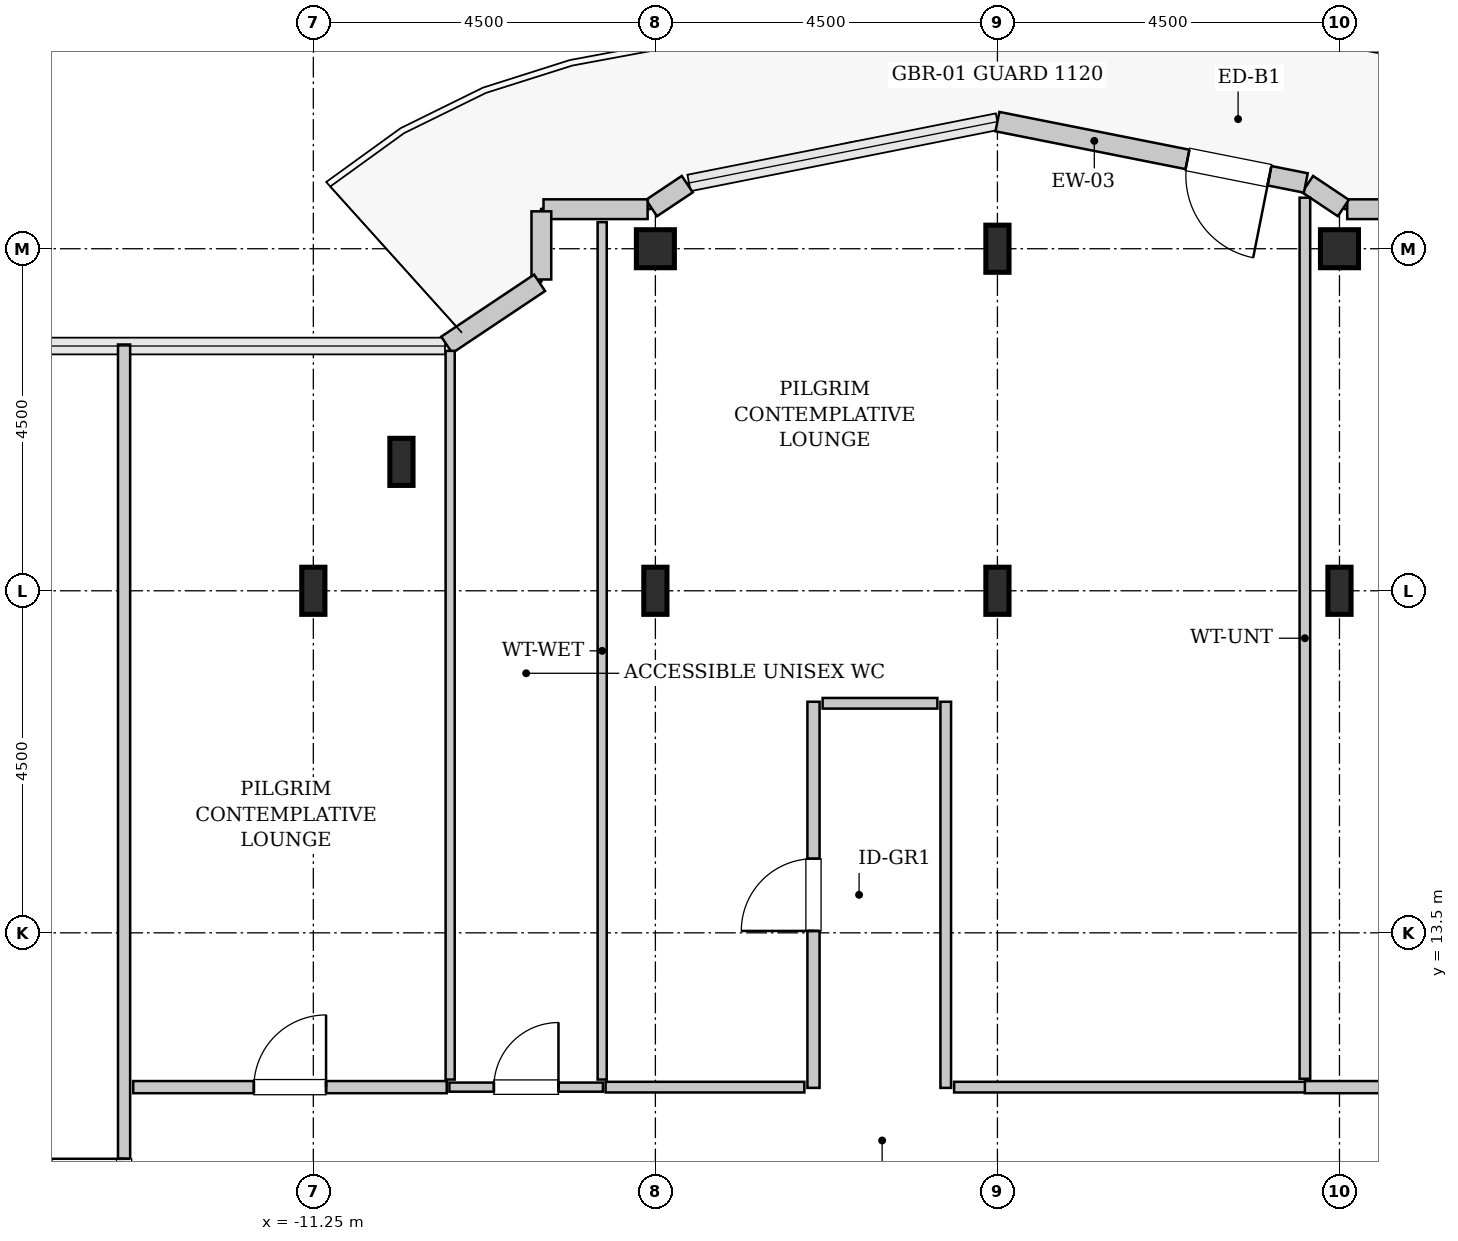
"""IFC4 building model, lengths in metres.
Left out: names, types, materials, properties, quantities, classifications, styles, units other than length and angle.
Written with IfcOpenShell. Run it as: python <this file> out.ifc"""

import sys

from ifc_helpers import new_model, si_unit, direction, frame, frame_2d, origin, origin_2d, place, context, subcontext, project, spatial, rectangle, hollow_rectangle, i_section, extrude, source, transform, mapped, element, fill, save


model = new_model("IFC4")
c1 = context("Model", 3, precision=1e-05, world=origin(), true_north=direction((0.0, 1.0)))
c2 = subcontext(c1, "Body", "Model", "MODEL_VIEW")
j1 = project(units=[si_unit("LENGTHUNIT", "METRE"), si_unit("PLANEANGLEUNIT", "RADIAN")], contexts=[c1])
p1 = place(None, origin())
s1 = spatial("IfcSite", under=j1, at=p1, CompositionType="ELEMENT")
p2 = place(p1, origin())
s2 = spatial("IfcBuilding", under=s1, at=p2, CompositionType="ELEMENT")
p3 = place(p2, frame((0.0, 0.0, 306.4)))
s3 = spatial("IfcBuildingStorey", under=s2, at=p3, CompositionType="ELEMENT", Elevation=306.4)
m1 = source(origin(), c2, "Body", "SweptSolid", [
    extrude(i_section(OverallWidth=0.305, OverallDepth=0.62, WebThickness=0.021, FlangeThickness=0.04, FilletRadius=0.027, at=origin_2d()), origin(), (0.0, 0.0, 1.0), 3.8),
])
for number, where, z_axis, x_axis in (
    (1, (-11.25, 18.0, 0.0), (0.0, 0.0, 1.0), (1.0, 0.0, 0.0)),
    (2, (-10.091, 19.696, 0.0), (0.0, 0.0, 1.0), (1.0, 0.0, 0.0)),
    (3, (-6.75, 18.0, 0.0), (0.0, 0.0, 1.0), (1.0, 0.0, 0.0)),
):
    element("IfcColumn", number, at=place(p3, frame(where, z_axis=z_axis, x_axis=x_axis)), inside=s3, PredefinedType="COLUMN", context=c2, shape_type="MappedRepresentation", body=[
        mapped(m1, transform((0.0, 0.0, 0.0), x_axis=(1.0, 0.0, 0.0), y_axis=(0.0, 1.0, 0.0), z_axis=(0.0, 0.0, 1.0), scale=1.0)),
    ])
m2 = source(origin(), c2, "Body", "SweptSolid", [
    extrude(hollow_rectangle(XDim=0.5, YDim=0.5, WallThickness=0.025, InnerFilletRadius=0.025, OuterFilletRadius=0.05, at=origin_2d()), origin(), (0.0, 0.0, 1.0), 3.8),
])
p4 = place(p3, frame((-6.75, 22.5, 0.0), z_axis=(0.0, 0.0, 1.0), x_axis=(1.0, 0.0, 0.0)))
e4 = element("IfcColumn", 4, at=p4, inside=s3, PredefinedType="COLUMN", context=c2, shape_type="MappedRepresentation", body=[
    mapped(m2, transform((0.0, 0.0, 0.0), x_axis=(1.0, 0.0, 0.0), y_axis=(0.0, 1.0, 0.0), z_axis=(0.0, 0.0, 1.0), scale=1.0)),
])
for number, where, z_axis, x_axis in (
    (5, (-2.25, 18.0, 0.0), (0.0, 0.0, 1.0), (1.0, 0.0, 0.0)),
    (6, (-2.25, 22.5, 0.0), (0.0, 0.0, 1.0), (1.0, 0.0, 0.0)),
    (7, (2.25, 18.0, 0.0), (0.0, 0.0, 1.0), (1.0, 0.0, 0.0)),
):
    element("IfcColumn", number, at=place(p3, frame(where, z_axis=z_axis, x_axis=x_axis)), inside=s3, PredefinedType="COLUMN", context=c2, shape_type="MappedRepresentation", body=[
        mapped(m1, transform((0.0, 0.0, 0.0), x_axis=(1.0, 0.0, 0.0), y_axis=(0.0, 1.0, 0.0), z_axis=(0.0, 0.0, 1.0), scale=1.0)),
    ])
p5 = place(p3, frame((2.25, 22.5, 0.0), z_axis=(0.0, 0.0, 1.0), x_axis=(1.0, 0.0, 0.0)))
e8 = element("IfcColumn", 8, at=p5, inside=s3, PredefinedType="COLUMN", context=c2, shape_type="MappedRepresentation", body=[
    mapped(m2, transform((0.0, 0.0, 0.0), x_axis=(1.0, 0.0, 0.0), y_axis=(0.0, 1.0, 0.0), z_axis=(0.0, 0.0, 1.0), scale=1.0)),
])
m3 = source(origin(), c2, "Body", "SweptSolid", [
    extrude(rectangle(XDim=1.37, YDim=0.26, at=frame_2d((0.685, 0.0))), origin(), (0.0, 0.0, 1.0), 3.55),
])
p6 = place(p3, frame((3.722, 23.02, 0.0), z_axis=(0.0, 0.0, 1.0), x_axis=(-1.0, 0.0, 0.0)))
e9 = element("IfcWall", 9, at=p6, inside=s3, PredefinedType="SOLIDWALL", context=c2, shape_type="MappedRepresentation", body=[
    mapped(m3, transform((0.0, 0.0, 0.0), x_axis=(1.0, 0.0, 0.0), y_axis=(0.0, 1.0, 0.0), z_axis=(0.0, 0.0, 1.0), scale=1.0)),
])
m4 = source(origin(), c2, "Body", "SweptSolid", [
    extrude(rectangle(XDim=0.565, YDim=0.26, at=frame_2d((0.283, 0.0))), origin(), (0.0, 0.0, 1.0), 3.55),
])
p7 = place(p3, frame((2.301, 23.036, 0.0), z_axis=(0.0, 0.0, 1.0), x_axis=(-0.831651492666, 0.555297933317, 0.0)))
e10 = element("IfcWall", 10, at=p7, inside=s3, PredefinedType="SOLIDWALL", context=c2, shape_type="MappedRepresentation", body=[
    mapped(m4, transform((0.0, 0.0, 0.0), x_axis=(1.0, 0.0, 0.0), y_axis=(0.0, 1.0, 0.0), z_axis=(0.0, 0.0, 1.0), scale=1.0)),
])
m5 = source(origin(), c2, "Body", "SweptSolid", [
    extrude(rectangle(XDim=4.137, YDim=0.26, at=frame_2d((2.068, 0.0))), origin(), (0.0, 0.0, 1.0), 3.55),
])
p8 = place(p3, frame((1.807, 23.365, 0.0), z_axis=(0.0, 0.0, 1.0), x_axis=(-0.980782170794, 0.195105954428, 0.0)))
e11 = element("IfcWall", 11, at=p8, inside=s3, PredefinedType="SOLIDWALL", context=c2, shape_type="MappedRepresentation", body=[
    mapped(m5, transform((0.0, 0.0, 0.0), x_axis=(1.0, 0.0, 0.0), y_axis=(0.0, 1.0, 0.0), z_axis=(0.0, 0.0, 1.0), scale=1.0)),
])
p9 = place(p8, frame((0.488, 0.0, 0.0)))
e12 = element("IfcOpeningElement", 12, at=p9, cuts=e11, PredefinedType="OPENING", context=c2, shape_type="SweptSolid", body=[
    extrude(rectangle(XDim=1.1, YDim=2.2, at=frame_2d((0.55, 1.1))), frame((0.0, 0.14, 0.0), z_axis=(0.0, -1.0, 0.0), x_axis=(1.0, 0.0, 0.0)), (0.0, 0.0, 1.0), 0.28),
])
p10 = place(p3, frame((-6.331, 23.35, 0.0), z_axis=(0.0, 0.0, 1.0), x_axis=(-0.831651492666, -0.555297933317, 0.0)))
e13 = element("IfcWall", 13, at=p10, inside=s3, PredefinedType="SOLIDWALL", context=c2, shape_type="MappedRepresentation", body=[
    mapped(m4, transform((0.0, 0.0, 0.0), x_axis=(1.0, 0.0, 0.0), y_axis=(0.0, 1.0, 0.0), z_axis=(0.0, 0.0, 1.0), scale=1.0)),
])
p11 = place(p3, frame((-6.852, 23.02, 0.0), z_axis=(0.0, 0.0, 1.0), x_axis=(-1.0, 0.0, 0.0)))
e14 = element("IfcWall", 14, at=p11, inside=s3, PredefinedType="SOLIDWALL", context=c2, shape_type="MappedRepresentation", body=[
    mapped(m3, transform((0.0, 0.0, 0.0), x_axis=(1.0, 0.0, 0.0), y_axis=(0.0, 1.0, 0.0), z_axis=(0.0, 0.0, 1.0), scale=1.0)),
])
m6 = source(origin(), c2, "Body", "SweptSolid", [
    extrude(rectangle(XDim=0.897, YDim=0.26, at=frame_2d((0.448, 0.0))), origin(), (0.0, 0.0, 1.0), 3.55),
])
p12 = place(p3, frame((-8.25, 22.992, 0.0), z_axis=(0.0, 0.0, 1.0), x_axis=(0.0, -1.0, 0.0)))
e15 = element("IfcWall", 15, at=p12, inside=s3, PredefinedType="SOLIDWALL", context=c2, shape_type="MappedRepresentation", body=[
    mapped(m6, transform((0.0, 0.0, 0.0), x_axis=(1.0, 0.0, 0.0), y_axis=(0.0, 1.0, 0.0), z_axis=(0.0, 0.0, 1.0), scale=1.0)),
])
m7 = source(origin(), c2, "Body", "SweptSolid", [
    extrude(rectangle(XDim=1.469, YDim=0.26, at=frame_2d((0.734, 0.0))), origin(), (0.0, 0.0, 1.0), 3.55),
])
p13 = place(p3, frame((-8.273, 22.052, 0.0), z_axis=(0.0, 0.0, 1.0), x_axis=(-0.831461760506, -0.555581983884, 0.0)))
e16 = element("IfcWall", 16, at=p13, inside=s3, PredefinedType="SOLIDWALL", context=c2, shape_type="MappedRepresentation", body=[
    mapped(m7, transform((0.0, 0.0, 0.0), x_axis=(1.0, 0.0, 0.0), y_axis=(0.0, 1.0, 0.0), z_axis=(0.0, 0.0, 1.0), scale=1.0)),
])
m8 = source(origin(), c2, "Body", "SweptSolid", [
    extrude(rectangle(XDim=2.02, YDim=0.12, at=frame_2d((1.01, 0.0))), origin(), (0.0, 0.0, 1.0), 3.535),
])
p14 = place(p3, frame((-9.46, 11.47, 0.0), z_axis=(0.0, 0.0, 1.0), x_axis=(1.0, 0.0, 0.0)))
e17 = element("IfcWall", 17, at=p14, inside=s3, PredefinedType="PLUMBINGWALL", context=c2, shape_type="MappedRepresentation", body=[
    mapped(m8, transform((0.0, 0.0, 0.0), x_axis=(1.0, 0.0, 0.0), y_axis=(0.0, 1.0, 0.0), z_axis=(0.0, 0.0, 1.0), scale=1.0)),
])
p15 = place(p14, frame((0.585, 0.0, 0.0)))
e18 = element("IfcOpeningElement", 18, at=p15, cuts=e17, PredefinedType="OPENING", context=c2, shape_type="SweptSolid", body=[
    extrude(rectangle(XDim=0.85, YDim=2.1, at=frame_2d((0.425, 1.05))), frame((0.0, 0.07, 0.0), z_axis=(0.0, -1.0, 0.0), x_axis=(1.0, 0.0, 0.0)), (0.0, 0.0, 1.0), 0.14),
])
m9 = source(origin(), c2, "Body", "SweptSolid", [
    extrude(rectangle(XDim=11.28, YDim=0.12, at=frame_2d((5.64, 0.0))), origin(), (0.0, 0.0, 1.0), 3.535),
])
p16 = place(p3, frame((-7.45, 11.57, 0.0), z_axis=(0.0, 0.0, 1.0), x_axis=(0.0, 1.0, 0.0)))
e19 = element("IfcWall", 19, at=p16, inside=s3, PredefinedType="PLUMBINGWALL", context=c2, shape_type="MappedRepresentation", body=[
    mapped(m9, transform((0.0, 0.0, 0.0), x_axis=(1.0, 0.0, 0.0), y_axis=(0.0, 1.0, 0.0), z_axis=(0.0, 0.0, 1.0), scale=1.0)),
])
m10 = source(origin(), c2, "Body", "SweptSolid", [
    extrude(rectangle(XDim=9.587, YDim=0.12, at=frame_2d((4.793, 0.0))), origin(), (0.0, 0.0, 1.0), 3.535),
])
p17 = place(p3, frame((-9.45, 11.57, 0.0), z_axis=(0.0, 0.0, 1.0), x_axis=(0.0, 1.0, 0.0)))
e20 = element("IfcWall", 20, at=p17, inside=s3, PredefinedType="PLUMBINGWALL", context=c2, shape_type="MappedRepresentation", body=[
    mapped(m10, transform((0.0, 0.0, 0.0), x_axis=(1.0, 0.0, 0.0), y_axis=(0.0, 1.0, 0.0), z_axis=(0.0, 0.0, 1.0), scale=1.0)),
])
m11 = source(origin(), c2, "Body", "SweptSolid", [
    extrude(rectangle(XDim=12.645, YDim=0.16, at=frame_2d((6.323, 0.0))), origin(), (0.0, 0.0, 1.0), 3.535),
])
p18 = place(p3, frame((-13.74, 8.595, 0.0), z_axis=(0.0, 0.0, 1.0), x_axis=(0.0, 1.0, 0.0)))
e21 = element("IfcWall", 21, at=p18, inside=s3, PredefinedType="PARTITIONING", context=c2, shape_type="MappedRepresentation", body=[
    mapped(m11, transform((0.0, 0.0, 0.0), x_axis=(1.0, 0.0, 0.0), y_axis=(0.0, 1.0, 0.0), z_axis=(0.0, 0.0, 1.0), scale=1.0)),
])
p19 = place(p18, frame((0.982, 0.0, 0.0)))
e22 = element("IfcOpeningElement", 22, at=p19, cuts=e21, PredefinedType="OPENING", context=c2, shape_type="SweptSolid", body=[
    extrude(rectangle(XDim=0.95, YDim=2.1, at=frame_2d((0.475, 1.05))), frame((0.0, 0.09, 0.0), z_axis=(0.0, -1.0, 0.0), x_axis=(1.0, 0.0, 0.0)), (0.0, 0.0, 1.0), 0.18),
])
m12 = source(origin(), c2, "Body", "SweptSolid", [
    extrude(rectangle(XDim=4.125, YDim=0.16, at=frame_2d((2.062, 0.0))), origin(), (0.0, 0.0, 1.0), 3.535),
])
p20 = place(p3, frame((-13.62, 11.47, 0.0), z_axis=(0.0, 0.0, 1.0), x_axis=(1.0, 0.0, 0.0)))
e23 = element("IfcWall", 23, at=p20, inside=s3, PredefinedType="PARTITIONING", context=c2, shape_type="MappedRepresentation", body=[
    mapped(m12, transform((0.0, 0.0, 0.0), x_axis=(1.0, 0.0, 0.0), y_axis=(0.0, 1.0, 0.0), z_axis=(0.0, 0.0, 1.0), scale=1.0)),
])
p21 = place(p20, frame((1.587, 0.0, 0.0)))
e24 = element("IfcOpeningElement", 24, at=p21, cuts=e23, PredefinedType="OPENING", context=c2, shape_type="SweptSolid", body=[
    extrude(rectangle(XDim=0.95, YDim=2.1, at=frame_2d((0.475, 1.05))), frame((0.0, 0.09, 0.0), z_axis=(0.0, -1.0, 0.0), x_axis=(1.0, 0.0, 0.0)), (0.0, 0.0, 1.0), 0.18),
])
m13 = source(origin(), c2, "Body", "SweptSolid", [
    extrude(rectangle(XDim=5.08, YDim=0.16, at=frame_2d((2.54, 0.0))), origin(), (0.0, 0.0, 1.0), 3.535),
])
p22 = place(p3, frame((-4.67, 11.46, 0.0), z_axis=(0.0, 0.0, 1.0), x_axis=(0.0, 1.0, 0.0)))
e25 = element("IfcWall", 25, at=p22, inside=s3, PredefinedType="PARTITIONING", context=c2, shape_type="MappedRepresentation", body=[
    mapped(m13, transform((0.0, 0.0, 0.0), x_axis=(1.0, 0.0, 0.0), y_axis=(0.0, 1.0, 0.0), z_axis=(0.0, 0.0, 1.0), scale=1.0)),
])
p23 = place(p22, frame((2.065, 0.0, 0.0)))
e26 = element("IfcOpeningElement", 26, at=p23, cuts=e25, PredefinedType="OPENING", context=c2, shape_type="SweptSolid", body=[
    extrude(rectangle(XDim=0.95, YDim=2.1, at=frame_2d((0.475, 1.05))), frame((0.0, 0.09, 0.0), z_axis=(0.0, -1.0, 0.0), x_axis=(1.0, 0.0, 0.0)), (0.0, 0.0, 1.0), 0.18),
])
m14 = source(origin(), c2, "Body", "SweptSolid", [
    extrude(rectangle(XDim=5.08, YDim=0.14, at=frame_2d((2.54, 0.0))), origin(), (0.0, 0.0, 1.0), 3.535),
])
p24 = place(p3, frame((-2.93, 11.46, 0.0), z_axis=(0.0, 0.0, 1.0), x_axis=(0.0, 1.0, 0.0)))
e27 = element("IfcWall", 27, at=p24, inside=s3, PredefinedType="PARTITIONING", context=c2, shape_type="MappedRepresentation", body=[
    mapped(m14, transform((0.0, 0.0, 0.0), x_axis=(1.0, 0.0, 0.0), y_axis=(0.0, 1.0, 0.0), z_axis=(0.0, 0.0, 1.0), scale=1.0)),
])
m15 = source(origin(), c2, "Body", "SweptSolid", [
    extrude(rectangle(XDim=4.625, YDim=0.14, at=frame_2d((2.312, 0.0))), origin(), (0.0, 0.0, 1.0), 3.535),
])
p25 = place(p3, frame((-2.82, 11.47, 0.0), z_axis=(0.0, 0.0, 1.0), x_axis=(1.0, 0.0, 0.0)))
e28 = element("IfcWall", 28, at=p25, inside=s3, PredefinedType="PARTITIONING", context=c2, shape_type="MappedRepresentation", body=[
    mapped(m15, transform((0.0, 0.0, 0.0), x_axis=(1.0, 0.0, 0.0), y_axis=(0.0, 1.0, 0.0), z_axis=(0.0, 0.0, 1.0), scale=1.0)),
])
m16 = source(origin(), c2, "Body", "SweptSolid", [
    extrude(rectangle(XDim=2.615, YDim=0.14, at=frame_2d((1.308, 0.0))), origin(), (0.0, 0.0, 1.0), 3.535),
])
p26 = place(p3, frame((-7.405, 11.47, 0.0), z_axis=(0.0, 0.0, 1.0), x_axis=(1.0, 0.0, 0.0)))
e29 = element("IfcWall", 29, at=p26, inside=s3, PredefinedType="PARTITIONING", context=c2, shape_type="MappedRepresentation", body=[
    mapped(m16, transform((0.0, 0.0, 0.0), x_axis=(1.0, 0.0, 0.0), y_axis=(0.0, 1.0, 0.0), z_axis=(0.0, 0.0, 1.0), scale=1.0)),
])
m17 = source(origin(), c2, "Body", "SweptSolid", [
    extrude(rectangle(XDim=1.51, YDim=0.14, at=frame_2d((0.755, 0.0))), origin(), (0.0, 0.0, 1.0), 3.535),
])
p27 = place(p3, frame((-4.55, 16.52, 0.0), z_axis=(0.0, 0.0, 1.0), x_axis=(1.0, 0.0, 0.0)))
e30 = element("IfcWall", 30, at=p27, inside=s3, PredefinedType="PARTITIONING", context=c2, shape_type="MappedRepresentation", body=[
    mapped(m17, transform((0.0, 0.0, 0.0), x_axis=(1.0, 0.0, 0.0), y_axis=(0.0, 1.0, 0.0), z_axis=(0.0, 0.0, 1.0), scale=1.0)),
])
m18 = source(origin(), c2, "Body", "SweptSolid", [
    extrude(rectangle(XDim=11.591, YDim=0.14, at=frame_2d((5.796, 0.0))), origin(), (0.0, 0.0, 1.0), 2.975),
])
p28 = place(p3, frame((1.795, 11.58, 0.0), z_axis=(0.0, 0.0, 1.0), x_axis=(0.0, 1.0, 0.0)))
e31 = element("IfcWall", 31, at=p28, inside=s3, PredefinedType="PARTITIONING", context=c2, shape_type="MappedRepresentation", body=[
    mapped(m18, transform((0.0, 0.0, 0.0), x_axis=(1.0, 0.0, 0.0), y_axis=(0.0, 1.0, 0.0), z_axis=(0.0, 0.0, 1.0), scale=1.0)),
])
m19 = source(origin(), c2, "Body", "SweptSolid", [
    extrude(rectangle(XDim=6.61, YDim=0.16, at=frame_2d((3.305, 0.0))), origin(), (0.0, 0.0, 1.0), 3.535),
])
p29 = place(p3, frame((1.795, 11.47, 0.0), z_axis=(0.0, 0.0, 1.0), x_axis=(1.0, 0.0, 0.0)))
e32 = element("IfcWall", 32, at=p29, inside=s3, PredefinedType="PARTITIONING", context=c2, shape_type="MappedRepresentation", body=[
    mapped(m19, transform((0.0, 0.0, 0.0), x_axis=(1.0, 0.0, 0.0), y_axis=(0.0, 1.0, 0.0), z_axis=(0.0, 0.0, 1.0), scale=1.0)),
])
p30 = place(p29, frame((2.83, 0.0, 0.0)))
e33 = element("IfcOpeningElement", 33, at=p30, cuts=e32, PredefinedType="OPENING", context=c2, shape_type="SweptSolid", body=[
    extrude(rectangle(XDim=0.95, YDim=2.1, at=frame_2d((0.475, 1.05))), frame((0.0, 0.09, 0.0), z_axis=(0.0, -1.0, 0.0), x_axis=(1.0, 0.0, 0.0)), (0.0, 0.0, 1.0), 0.18),
])
m20 = source(origin(), c2, "Body", "SweptSolid", [
    extrude(rectangle(XDim=1.1, YDim=2.2, at=frame_2d((0.55, 1.1))), frame((0.0, 0.025, 0.0), z_axis=(0.0, -1.0, 0.0), x_axis=(1.0, 0.0, 0.0)), (0.0, 0.0, 1.0), 0.05),
])
p31 = place(p9, origin())
e34 = element("IfcDoor", 34, at=p31, inside=s3, OperationType="SINGLE_SWING_LEFT", PredefinedType="DOOR", context=c2, shape_type="MappedRepresentation", body=[
    mapped(m20, transform((0.0, 0.0, 0.0), x_axis=(1.0, 0.0, 0.0), y_axis=(0.0, 1.0, 0.0), z_axis=(0.0, 0.0, 1.0), scale=1.0)),
])
fill(e12, e34)
m21 = source(origin(), c2, "Body", "SweptSolid", [
    extrude(rectangle(XDim=0.85, YDim=2.1, at=frame_2d((0.425, 1.05))), frame((0.0, 0.025, 0.0), z_axis=(0.0, -1.0, 0.0), x_axis=(1.0, 0.0, 0.0)), (0.0, 0.0, 1.0), 0.05),
])
p32 = place(p15, origin())
e35 = element("IfcDoor", 35, at=p32, inside=s3, OperationType="SINGLE_SWING_RIGHT", PredefinedType="DOOR", context=c2, shape_type="MappedRepresentation", body=[
    mapped(m21, transform((0.0, 0.0, 0.0), x_axis=(1.0, 0.0, 0.0), y_axis=(0.0, 1.0, 0.0), z_axis=(0.0, 0.0, 1.0), scale=1.0)),
])
fill(e18, e35)
m22 = source(origin(), c2, "Body", "SweptSolid", [
    extrude(rectangle(XDim=0.95, YDim=2.1, at=frame_2d((0.475, 1.05))), frame((0.0, 0.025, 0.0), z_axis=(0.0, -1.0, 0.0), x_axis=(1.0, 0.0, 0.0)), (0.0, 0.0, 1.0), 0.05),
])
p33 = place(p19, origin())
e36 = element("IfcDoor", 36, at=p33, inside=s3, OperationType="SINGLE_SWING_RIGHT", PredefinedType="DOOR", context=c2, shape_type="MappedRepresentation", body=[
    mapped(m22, transform((0.0, 0.0, 0.0), x_axis=(1.0, 0.0, 0.0), y_axis=(0.0, 1.0, 0.0), z_axis=(0.0, 0.0, 1.0), scale=1.0)),
])
fill(e22, e36)
p34 = place(p21, origin())
e37 = element("IfcDoor", 37, at=p34, inside=s3, OperationType="SINGLE_SWING_RIGHT", PredefinedType="DOOR", context=c2, shape_type="MappedRepresentation", body=[
    mapped(m22, transform((0.0, 0.0, 0.0), x_axis=(1.0, 0.0, 0.0), y_axis=(0.0, 1.0, 0.0), z_axis=(0.0, 0.0, 1.0), scale=1.0)),
])
fill(e24, e37)
p35 = place(p23, origin())
e38 = element("IfcDoor", 38, at=p35, inside=s3, OperationType="SINGLE_SWING_LEFT", PredefinedType="DOOR", context=c2, shape_type="MappedRepresentation", body=[
    mapped(m22, transform((0.0, 0.0, 0.0), x_axis=(1.0, 0.0, 0.0), y_axis=(0.0, 1.0, 0.0), z_axis=(0.0, 0.0, 1.0), scale=1.0)),
])
fill(e26, e38)
save(model, sys.argv[1])
